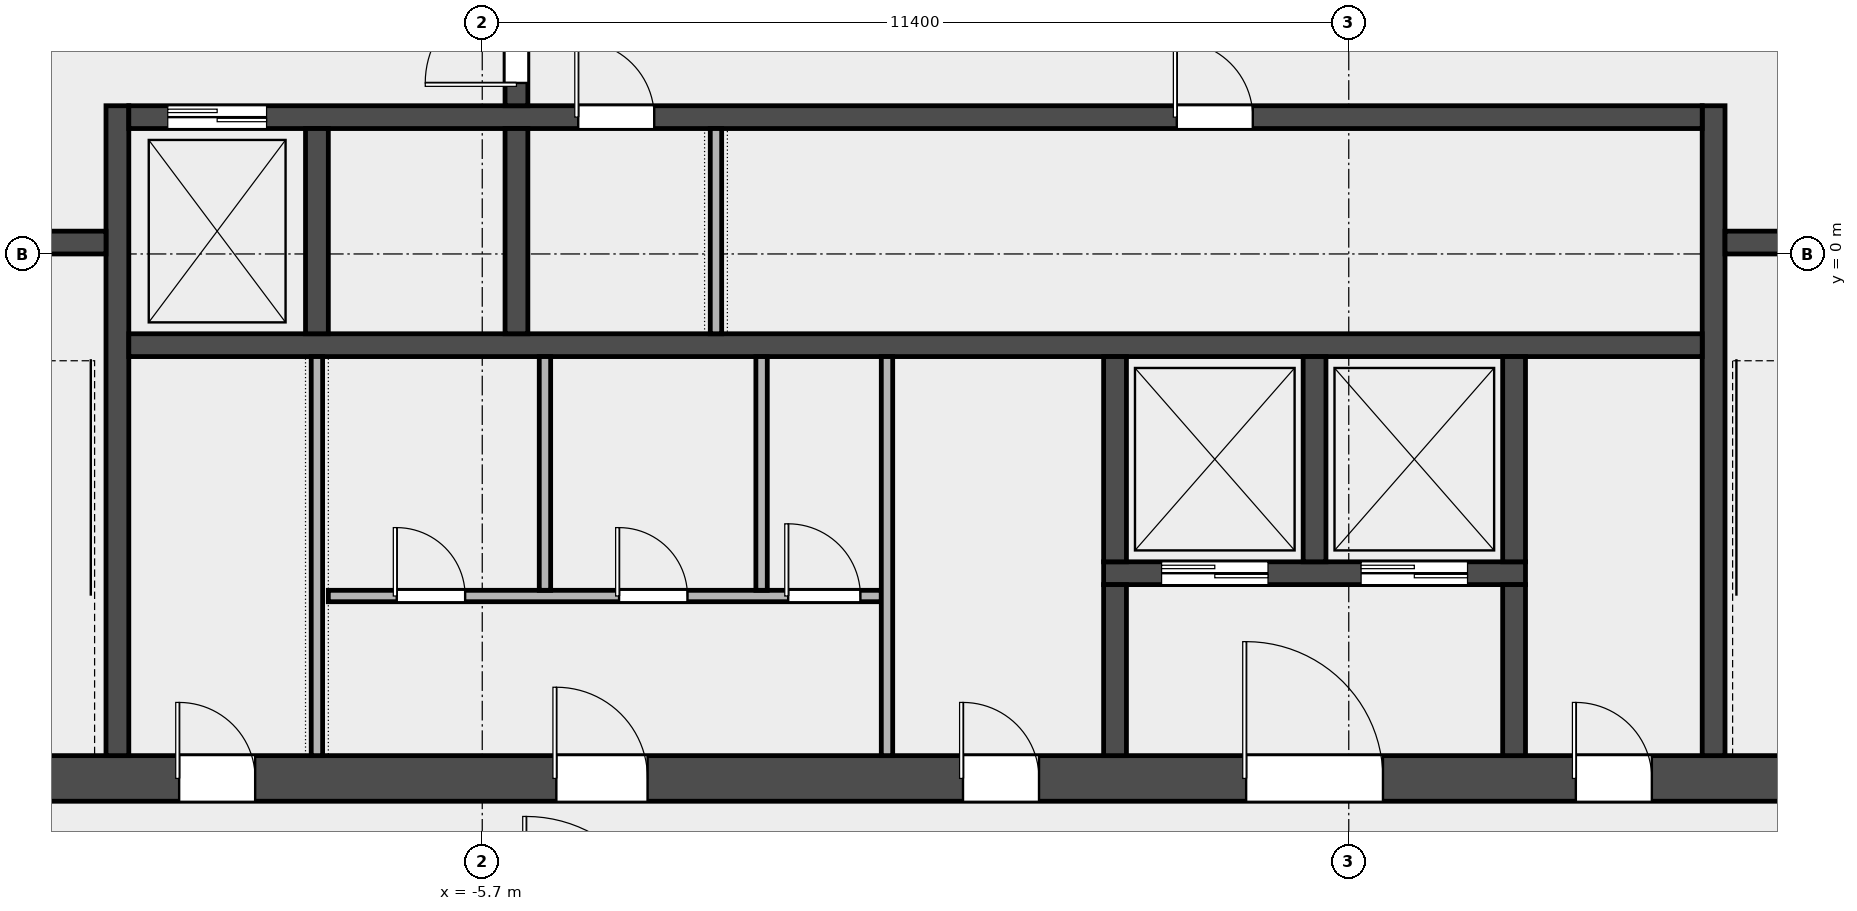
"""IFC4 building model, lengths in metres.
Left out: names, types, materials, properties, quantities, classifications, styles, units other than length and angle.
Written with IfcOpenShell. Run it as: python <this file> out.ifc"""

import sys

from ifc_helpers import new_model, si_unit, direction, frame, frame_2d, origin, place, context, subcontext, project, spatial, rectangle, extrude, element, fill, save


model = new_model("IFC4")
c1 = context("Model", 3, precision=1e-05, world=origin(), true_north=direction((0.0, 1.0)))
c2 = subcontext(c1, "Body", "Model", "MODEL_VIEW")
j1 = project(units=[si_unit("LENGTHUNIT", "METRE"), si_unit("PLANEANGLEUNIT", "RADIAN")], contexts=[c1])
p1 = place(None, origin())
s1 = spatial("IfcSite", under=j1, at=p1, CompositionType="ELEMENT")
p2 = place(p1, origin())
s2 = spatial("IfcBuilding", under=s1, at=p2, CompositionType="ELEMENT")
p3 = place(p2, frame((0.0, 0.0, 333.4)))
s3 = spatial("IfcBuildingStorey", under=s2, at=p3, CompositionType="ELEMENT", Elevation=333.4)
p4 = place(p3, frame((-14.4, -6.9, 0.0), z_axis=(0.0, 0.0, 1.0), x_axis=(1.0, 0.0, 0.0)))
e1 = element("IfcWall", 1, at=p4, inside=s3, PredefinedType="SHEAR", context=c2, shape_type="SweptSolid", body=[
    extrude(rectangle(XDim=28.8, YDim=0.6, at=frame_2d((14.4, 0.0))), origin(), (0.0, 0.0, 1.0), 3.7),
])
p5 = place(p4, frame((4.712, 0.0, 0.0)))
e2 = element("IfcOpeningElement", 2, at=p5, cuts=e1, PredefinedType="OPENING", context=c2, shape_type="SweptSolid", body=[
    extrude(rectangle(XDim=1.0, YDim=2.1, at=frame_2d((0.5, 1.05))), frame((0.0, 0.312, 0.0), z_axis=(0.0, -1.0, 0.0), x_axis=(1.0, 0.0, 0.0)), (0.0, 0.0, 1.0), 0.624),
])
p6 = place(p4, frame((9.675, 0.0, 0.0)))
e3 = element("IfcOpeningElement", 3, at=p6, cuts=e1, PredefinedType="OPENING", context=c2, shape_type="SweptSolid", body=[
    extrude(rectangle(XDim=1.2, YDim=2.1, at=frame_2d((0.6, 1.05))), frame((0.0, 0.312, 0.0), z_axis=(0.0, -1.0, 0.0), x_axis=(1.0, 0.0, 0.0)), (0.0, 0.0, 1.0), 0.624),
])
p7 = place(p4, frame((15.025, 0.0, 0.0)))
e4 = element("IfcOpeningElement", 4, at=p7, cuts=e1, PredefinedType="OPENING", context=c2, shape_type="SweptSolid", body=[
    extrude(rectangle(XDim=1.0, YDim=2.1, at=frame_2d((0.5, 1.05))), frame((0.0, 0.312, 0.0), z_axis=(0.0, -1.0, 0.0), x_axis=(1.0, 0.0, 0.0)), (0.0, 0.0, 1.0), 0.624),
])
p8 = place(p4, frame((18.75, 0.0, 0.0)))
e5 = element("IfcOpeningElement", 5, at=p8, cuts=e1, PredefinedType="OPENING", context=c2, shape_type="SweptSolid", body=[
    extrude(rectangle(XDim=1.8, YDim=2.1, at=frame_2d((0.9, 1.05))), frame((0.0, 0.312, 0.0), z_axis=(0.0, -1.0, 0.0), x_axis=(1.0, 0.0, 0.0)), (0.0, 0.0, 1.0), 0.624),
])
p9 = place(p4, frame((23.087, 0.0, 0.0)))
e6 = element("IfcOpeningElement", 6, at=p9, cuts=e1, PredefinedType="OPENING", context=c2, shape_type="SweptSolid", body=[
    extrude(rectangle(XDim=1.0, YDim=2.1, at=frame_2d((0.5, 1.05))), frame((0.0, 0.312, 0.0), z_axis=(0.0, -1.0, 0.0), x_axis=(1.0, 0.0, 0.0)), (0.0, 0.0, 1.0), 0.624),
])
for number, where, z_axis, x_axis in (
    (7, (-10.5, -6.6, 0.0), (0.0, 0.0, 1.0), (0.0, 1.0, 0.0)),
    (8, (10.5, -6.6, 0.0), (0.0, 0.0, 1.0), (0.0, 1.0, 0.0)),
):
    element("IfcWall", number, at=place(p3, frame(where, z_axis=z_axis, x_axis=x_axis)), inside=s3, PredefinedType="SHEAR", context=c2, shape_type="SweptSolid", body=[
        extrude(rectangle(XDim=8.55, YDim=0.3, at=frame_2d((4.275, 0.0))), origin(), (0.0, 0.0, 1.0), 3.7),
    ])
p10 = place(p3, frame((-13.8, 0.15, 0.0), z_axis=(0.0, 0.0, 1.0), x_axis=(1.0, 0.0, 0.0)))
e9 = element("IfcWall", 9, at=p10, inside=s3, PredefinedType="SOLIDWALL", context=c2, shape_type="SweptSolid", body=[
    extrude(rectangle(XDim=3.15, YDim=0.3, at=frame_2d((1.575, 0.0))), origin(), (0.0, 0.0, 1.0), 3.7),
])
p11 = place(p10, frame((0.975, 0.0, 0.0)))
e10 = element("IfcOpeningElement", 10, at=p11, cuts=e9, PredefinedType="OPENING", context=c2, shape_type="SweptSolid", body=[
    extrude(rectangle(XDim=1.1, YDim=2.1, at=frame_2d((0.55, 1.05))), frame((0.0, 0.162, 0.0), z_axis=(0.0, -1.0, 0.0), x_axis=(1.0, 0.0, 0.0)), (0.0, 0.0, 1.0), 0.324),
])
p12 = place(p3, frame((10.65, 0.15, 0.0), z_axis=(0.0, 0.0, 1.0), x_axis=(1.0, 0.0, 0.0)))
e11 = element("IfcWall", 11, at=p12, inside=s3, PredefinedType="SOLIDWALL", context=c2, shape_type="SweptSolid", body=[
    extrude(rectangle(XDim=3.15, YDim=0.3, at=frame_2d((1.575, 0.0))), origin(), (0.0, 0.0, 1.0), 3.7),
])
p13 = place(p12, frame((1.025, 0.0, 0.0)))
e12 = element("IfcOpeningElement", 12, at=p13, cuts=e11, PredefinedType="OPENING", context=c2, shape_type="SweptSolid", body=[
    extrude(rectangle(XDim=1.1, YDim=2.1, at=frame_2d((0.55, 1.05))), frame((0.0, 0.162, 0.0), z_axis=(0.0, -1.0, 0.0), x_axis=(1.0, 0.0, 0.0)), (0.0, 0.0, 1.0), 0.324),
])
p14 = place(p3, frame((-10.35, -1.2, 0.0), z_axis=(0.0, 0.0, 1.0), x_axis=(1.0, 0.0, 0.0)))
e13 = element("IfcWall", 13, at=p14, inside=s3, PredefinedType="SOLIDWALL", context=c2, shape_type="SweptSolid", body=[
    extrude(rectangle(XDim=20.7, YDim=0.3, at=frame_2d((10.35, 0.0))), origin(), (0.0, 0.0, 1.0), 3.7),
])
p15 = place(p3, frame((-10.35, 1.8, 0.0), z_axis=(0.0, 0.0, 1.0), x_axis=(1.0, 0.0, 0.0)))
e14 = element("IfcWall", 14, at=p15, inside=s3, PredefinedType="SOLIDWALL", context=c2, shape_type="SweptSolid", body=[
    extrude(rectangle(XDim=20.7, YDim=0.3, at=frame_2d((10.35, 0.0))), origin(), (0.0, 0.0, 1.0), 3.7),
])
p16 = place(p15, frame((0.512, 0.0, 0.0)))
e15 = element("IfcOpeningElement", 15, at=p16, cuts=e14, PredefinedType="OPENING", context=c2, shape_type="SweptSolid", body=[
    extrude(rectangle(XDim=1.3, YDim=2.1, at=frame_2d((0.65, 1.05))), frame((0.0, 0.162, 0.0), z_axis=(0.0, -1.0, 0.0), x_axis=(1.0, 0.0, 0.0)), (0.0, 0.0, 1.0), 0.324),
])
p17 = place(p15, frame((5.913, 0.0, 0.0)))
e16 = element("IfcOpeningElement", 16, at=p17, cuts=e14, PredefinedType="OPENING", context=c2, shape_type="SweptSolid", body=[
    extrude(rectangle(XDim=1.0, YDim=2.1, at=frame_2d((0.5, 1.05))), frame((0.0, 0.162, 0.0), z_axis=(0.0, -1.0, 0.0), x_axis=(1.0, 0.0, 0.0)), (0.0, 0.0, 1.0), 0.324),
])
p18 = place(p15, frame((13.788, 0.0, 0.0)))
e17 = element("IfcOpeningElement", 17, at=p18, cuts=e14, PredefinedType="OPENING", context=c2, shape_type="SweptSolid", body=[
    extrude(rectangle(XDim=1.0, YDim=2.1, at=frame_2d((0.5, 1.05))), frame((0.0, 0.162, 0.0), z_axis=(0.0, -1.0, 0.0), x_axis=(1.0, 0.0, 0.0)), (0.0, 0.0, 1.0), 0.324),
])
for number, where, z_axis, x_axis in (
    (18, (-7.875, -1.05, 0.0), (0.0, 0.0, 1.0), (0.0, 1.0, 0.0)),
    (19, (-5.25, -1.05, 0.0), (0.0, 0.0, 1.0), (0.0, 1.0, 0.0)),
):
    element("IfcWall", number, at=place(p3, frame(where, z_axis=z_axis, x_axis=x_axis)), inside=s3, PredefinedType="SOLIDWALL", context=c2, shape_type="SweptSolid", body=[
        extrude(rectangle(XDim=2.7, YDim=0.3, at=frame_2d((1.35, 0.0))), origin(), (0.0, 0.0, 1.0), 3.7),
    ])
p19 = place(p3, frame((-5.25, 1.95, 0.0), z_axis=(0.0, 0.0, 1.0), x_axis=(0.0, 1.0, 0.0)))
e20 = element("IfcWall", 20, at=p19, inside=s3, PredefinedType="SOLIDWALL", context=c2, shape_type="SweptSolid", body=[
    extrude(rectangle(XDim=3.3, YDim=0.3, at=frame_2d((1.65, 0.0))), origin(), (0.0, 0.0, 1.0), 3.7),
])
p20 = place(p19, frame((0.3, 0.0, 0.0)))
e21 = element("IfcOpeningElement", 21, at=p20, cuts=e20, PredefinedType="OPENING", context=c2, shape_type="SweptSolid", body=[
    extrude(rectangle(XDim=1.2, YDim=2.1, at=frame_2d((0.6, 1.05))), frame((0.0, 0.162, 0.0), z_axis=(0.0, -1.0, 0.0), x_axis=(1.0, 0.0, 0.0)), (0.0, 0.0, 1.0), 0.324),
])
p21 = place(p19, frame((1.8, 0.0, 0.0)))
e22 = element("IfcOpeningElement", 22, at=p21, cuts=e20, PredefinedType="OPENING", context=c2, shape_type="SweptSolid", body=[
    extrude(rectangle(XDim=1.2, YDim=2.1, at=frame_2d((0.6, 1.05))), frame((0.0, 0.162, 0.0), z_axis=(0.0, -1.0, 0.0), x_axis=(1.0, 0.0, 0.0)), (0.0, 0.0, 1.0), 0.324),
])
p22 = place(p3, frame((2.475, -4.2, 0.0), z_axis=(0.0, 0.0, 1.0), x_axis=(1.0, 0.0, 0.0)))
e23 = element("IfcWall", 23, at=p22, inside=s3, PredefinedType="SOLIDWALL", context=c2, shape_type="SweptSolid", body=[
    extrude(rectangle(XDim=5.55, YDim=0.3, at=frame_2d((2.775, 0.0))), origin(), (0.0, 0.0, 1.0), 3.7),
])
p23 = place(p22, frame((0.762, 0.0, 0.0)))
e24 = element("IfcOpeningElement", 24, at=p23, cuts=e23, PredefinedType="OPENING", context=c2, shape_type="SweptSolid", body=[
    extrude(rectangle(XDim=1.4, YDim=2.1, at=frame_2d((0.7, 1.05))), frame((0.0, 0.162, 0.0), z_axis=(0.0, -1.0, 0.0), x_axis=(1.0, 0.0, 0.0)), (0.0, 0.0, 1.0), 0.324),
])
p24 = place(p22, frame((3.387, 0.0, 0.0)))
e25 = element("IfcOpeningElement", 25, at=p24, cuts=e23, PredefinedType="OPENING", context=c2, shape_type="SweptSolid", body=[
    extrude(rectangle(XDim=1.4, YDim=2.1, at=frame_2d((0.7, 1.05))), frame((0.0, 0.162, 0.0), z_axis=(0.0, -1.0, 0.0), x_axis=(1.0, 0.0, 0.0)), (0.0, 0.0, 1.0), 0.324),
])
p25 = place(p3, frame((2.625, -4.05, 0.0), z_axis=(0.0, 0.0, 1.0), x_axis=(0.0, 1.0, 0.0)))
e26 = element("IfcWall", 26, at=p25, inside=s3, PredefinedType="SOLIDWALL", context=c2, shape_type="SweptSolid", body=[
    extrude(rectangle(XDim=2.7, YDim=0.3, at=frame_2d((1.35, 0.0))), origin(), (0.0, 0.0, 1.0), 3.7),
])
p26 = place(p3, frame((2.625, -6.6, 0.0), z_axis=(0.0, 0.0, 1.0), x_axis=(0.0, 1.0, 0.0)))
e27 = element("IfcWall", 27, at=p26, inside=s3, PredefinedType="SOLIDWALL", context=c2, shape_type="SweptSolid", body=[
    extrude(rectangle(XDim=2.25, YDim=0.3, at=frame_2d((1.125, 0.0))), origin(), (0.0, 0.0, 1.0), 3.7),
])
for number, where, z_axis, x_axis in (
    (28, (5.25, -4.05, 0.0), (0.0, 0.0, 1.0), (0.0, 1.0, 0.0)),
    (29, (7.875, -4.05, 0.0), (0.0, 0.0, 1.0), (0.0, 1.0, 0.0)),
):
    element("IfcWall", number, at=place(p3, frame(where, z_axis=z_axis, x_axis=x_axis)), inside=s3, PredefinedType="SOLIDWALL", context=c2, shape_type="SweptSolid", body=[
        extrude(rectangle(XDim=2.7, YDim=0.3, at=frame_2d((1.35, 0.0))), origin(), (0.0, 0.0, 1.0), 3.7),
    ])
p27 = place(p3, frame((7.875, -6.6, 0.0), z_axis=(0.0, 0.0, 1.0), x_axis=(0.0, 1.0, 0.0)))
e30 = element("IfcWall", 30, at=p27, inside=s3, PredefinedType="SOLIDWALL", context=c2, shape_type="SweptSolid", body=[
    extrude(rectangle(XDim=2.25, YDim=0.3, at=frame_2d((1.125, 0.0))), origin(), (0.0, 0.0, 1.0), 3.7),
])
p28 = place(p3, frame((-7.875, -6.6, 0.0), z_axis=(0.0, 0.0, 1.0), x_axis=(0.0, 1.0, 0.0)))
e31 = element("IfcWall", 31, at=p28, inside=s3, PredefinedType="PARTITIONING", context=c2, shape_type="SweptSolid", body=[
    extrude(rectangle(XDim=5.25, YDim=0.15, at=frame_2d((2.625, 0.0))), origin(), (0.0, 0.0, 1.0), 3.7),
])
p29 = place(p3, frame((-7.725, -4.5, 0.0), z_axis=(0.0, 0.0, 1.0), x_axis=(1.0, 0.0, 0.0)))
e32 = element("IfcWall", 32, at=p29, inside=s3, PredefinedType="PARTITIONING", context=c2, shape_type="SweptSolid", body=[
    extrude(rectangle(XDim=7.275, YDim=0.15, at=frame_2d((3.638, 0.0))), origin(), (0.0, 0.0, 1.0), 3.7),
])
p30 = place(p29, frame((0.9, 0.0, 0.0)))
e33 = element("IfcOpeningElement", 33, at=p30, cuts=e32, PredefinedType="OPENING", context=c2, shape_type="SweptSolid", body=[
    extrude(rectangle(XDim=0.9, YDim=2.1, at=frame_2d((0.45, 1.05))), frame((0.0, 0.087, 0.0), z_axis=(0.0, -1.0, 0.0), x_axis=(1.0, 0.0, 0.0)), (0.0, 0.0, 1.0), 0.174),
])
p31 = place(p29, frame((3.825, 0.0, 0.0)))
e34 = element("IfcOpeningElement", 34, at=p31, cuts=e32, PredefinedType="OPENING", context=c2, shape_type="SweptSolid", body=[
    extrude(rectangle(XDim=0.9, YDim=2.1, at=frame_2d((0.45, 1.05))), frame((0.0, 0.087, 0.0), z_axis=(0.0, -1.0, 0.0), x_axis=(1.0, 0.0, 0.0)), (0.0, 0.0, 1.0), 0.174),
])
p32 = place(p29, frame((6.05, 0.0, 0.0)))
e35 = element("IfcOpeningElement", 35, at=p32, cuts=e32, PredefinedType="OPENING", context=c2, shape_type="SweptSolid", body=[
    extrude(rectangle(XDim=0.95, YDim=2.1, at=frame_2d((0.475, 1.05))), frame((0.0, 0.087, 0.0), z_axis=(0.0, -1.0, 0.0), x_axis=(1.0, 0.0, 0.0)), (0.0, 0.0, 1.0), 0.174),
])
for number, where, z_axis, x_axis in (
    (36, (-4.875, -4.425, 0.0), (0.0, 0.0, 1.0), (0.0, 1.0, 0.0)),
    (37, (-2.025, -4.425, 0.0), (0.0, 0.0, 1.0), (0.0, 1.0, 0.0)),
):
    element("IfcWall", number, at=place(p3, frame(where, z_axis=z_axis, x_axis=x_axis)), inside=s3, PredefinedType="PARTITIONING", context=c2, shape_type="SweptSolid", body=[
        extrude(rectangle(XDim=3.075, YDim=0.15, at=frame_2d((1.538, 0.0))), origin(), (0.0, 0.0, 1.0), 3.7),
    ])
p33 = place(p3, frame((-0.375, -6.6, 0.0), z_axis=(0.0, 0.0, 1.0), x_axis=(0.0, 1.0, 0.0)))
e38 = element("IfcWall", 38, at=p33, inside=s3, PredefinedType="PARTITIONING", context=c2, shape_type="SweptSolid", body=[
    extrude(rectangle(XDim=5.25, YDim=0.15, at=frame_2d((2.625, 0.0))), origin(), (0.0, 0.0, 1.0), 3.7),
])
p34 = place(p3, frame((-2.625, -1.05, 0.0), z_axis=(0.0, 0.0, 1.0), x_axis=(0.0, 1.0, 0.0)))
e39 = element("IfcWall", 39, at=p34, inside=s3, PredefinedType="PARTITIONING", context=c2, shape_type="SweptSolid", body=[
    extrude(rectangle(XDim=2.7, YDim=0.15, at=frame_2d((1.35, 0.0))), origin(), (0.0, 0.0, 1.0), 3.7),
])
p35 = place(p20, origin())
e40 = element("IfcDoor", 40, at=p35, inside=s3, OperationType="SINGLE_SWING_LEFT", PredefinedType="DOOR", context=c2, shape_type="SweptSolid", body=[
    extrude(rectangle(XDim=1.2, YDim=2.1, at=frame_2d((0.6, 1.05))), frame((0.0, 0.025, 0.0), z_axis=(0.0, -1.0, 0.0), x_axis=(1.0, 0.0, 0.0)), (0.0, 0.0, 1.0), 0.05),
])
fill(e21, e40)
p36 = place(p16, origin())
e41 = element("IfcDoor", 41, at=p36, inside=s3, OperationType="DOUBLE_DOOR_SLIDING", PredefinedType="DOOR", context=c2, shape_type="SweptSolid", body=[
    extrude(rectangle(XDim=1.3, YDim=2.1, at=frame_2d((0.65, 1.05))), frame((0.0, 0.025, 0.0), z_axis=(0.0, -1.0, 0.0), x_axis=(1.0, 0.0, 0.0)), (0.0, 0.0, 1.0), 0.05),
])
fill(e15, e41)
p37 = place(p23, origin())
e42 = element("IfcDoor", 42, at=p37, inside=s3, OperationType="DOUBLE_DOOR_SLIDING", PredefinedType="DOOR", context=c2, shape_type="SweptSolid", body=[
    extrude(rectangle(XDim=1.4, YDim=2.1, at=frame_2d((0.7, 1.05))), frame((0.0, 0.025, 0.0), z_axis=(0.0, -1.0, 0.0), x_axis=(1.0, 0.0, 0.0)), (0.0, 0.0, 1.0), 0.05),
])
fill(e24, e42)
p38 = place(p24, origin())
e43 = element("IfcDoor", 43, at=p38, inside=s3, OperationType="DOUBLE_DOOR_SLIDING", PredefinedType="DOOR", context=c2, shape_type="SweptSolid", body=[
    extrude(rectangle(XDim=1.4, YDim=2.1, at=frame_2d((0.7, 1.05))), frame((0.0, 0.025, 0.0), z_axis=(0.0, -1.0, 0.0), x_axis=(1.0, 0.0, 0.0)), (0.0, 0.0, 1.0), 0.05),
])
fill(e25, e43)
p39 = place(p5, origin())
e44 = element("IfcDoor", 44, at=p39, inside=s3, OperationType="SINGLE_SWING_LEFT", PredefinedType="DOOR", context=c2, shape_type="SweptSolid", body=[
    extrude(rectangle(XDim=1.0, YDim=2.1, at=frame_2d((0.5, 1.05))), frame((0.0, 0.025, 0.0), z_axis=(0.0, -1.0, 0.0), x_axis=(1.0, 0.0, 0.0)), (0.0, 0.0, 1.0), 0.05),
])
fill(e2, e44)
p40 = place(p6, origin())
e45 = element("IfcDoor", 45, at=p40, inside=s3, OperationType="SINGLE_SWING_LEFT", PredefinedType="DOOR", context=c2, shape_type="SweptSolid", body=[
    extrude(rectangle(XDim=1.2, YDim=2.1, at=frame_2d((0.6, 1.05))), frame((0.0, 0.025, 0.0), z_axis=(0.0, -1.0, 0.0), x_axis=(1.0, 0.0, 0.0)), (0.0, 0.0, 1.0), 0.05),
])
fill(e3, e45)
p41 = place(p30, origin())
e46 = element("IfcDoor", 46, at=p41, inside=s3, OperationType="SINGLE_SWING_LEFT", PredefinedType="DOOR", context=c2, shape_type="SweptSolid", body=[
    extrude(rectangle(XDim=0.9, YDim=2.1, at=frame_2d((0.45, 1.05))), frame((0.0, 0.025, 0.0), z_axis=(0.0, -1.0, 0.0), x_axis=(1.0, 0.0, 0.0)), (0.0, 0.0, 1.0), 0.05),
])
fill(e33, e46)
p42 = place(p31, origin())
e47 = element("IfcDoor", 47, at=p42, inside=s3, OperationType="SINGLE_SWING_LEFT", PredefinedType="DOOR", context=c2, shape_type="SweptSolid", body=[
    extrude(rectangle(XDim=0.9, YDim=2.1, at=frame_2d((0.45, 1.05))), frame((0.0, 0.025, 0.0), z_axis=(0.0, -1.0, 0.0), x_axis=(1.0, 0.0, 0.0)), (0.0, 0.0, 1.0), 0.05),
])
fill(e34, e47)
p43 = place(p32, origin())
e48 = element("IfcDoor", 48, at=p43, inside=s3, OperationType="SINGLE_SWING_LEFT", PredefinedType="DOOR", context=c2, shape_type="SweptSolid", body=[
    extrude(rectangle(XDim=0.95, YDim=2.1, at=frame_2d((0.475, 1.05))), frame((0.0, 0.025, 0.0), z_axis=(0.0, -1.0, 0.0), x_axis=(1.0, 0.0, 0.0)), (0.0, 0.0, 1.0), 0.05),
])
fill(e35, e48)
p44 = place(p7, origin())
e49 = element("IfcDoor", 49, at=p44, inside=s3, OperationType="SINGLE_SWING_LEFT", PredefinedType="DOOR", context=c2, shape_type="SweptSolid", body=[
    extrude(rectangle(XDim=1.0, YDim=2.1, at=frame_2d((0.5, 1.05))), frame((0.0, 0.025, 0.0), z_axis=(0.0, -1.0, 0.0), x_axis=(1.0, 0.0, 0.0)), (0.0, 0.0, 1.0), 0.05),
])
fill(e4, e49)
p45 = place(p8, origin())
e50 = element("IfcDoor", 50, at=p45, inside=s3, OperationType="DOUBLE_DOOR_SINGLE_SWING", PredefinedType="DOOR", context=c2, shape_type="SweptSolid", body=[
    extrude(rectangle(XDim=1.8, YDim=2.1, at=frame_2d((0.9, 1.05))), frame((0.0, 0.025, 0.0), z_axis=(0.0, -1.0, 0.0), x_axis=(1.0, 0.0, 0.0)), (0.0, 0.0, 1.0), 0.05),
])
fill(e5, e50)
p46 = place(p9, origin())
e51 = element("IfcDoor", 51, at=p46, inside=s3, OperationType="SINGLE_SWING_LEFT", PredefinedType="DOOR", context=c2, shape_type="SweptSolid", body=[
    extrude(rectangle(XDim=1.0, YDim=2.1, at=frame_2d((0.5, 1.05))), frame((0.0, 0.025, 0.0), z_axis=(0.0, -1.0, 0.0), x_axis=(1.0, 0.0, 0.0)), (0.0, 0.0, 1.0), 0.05),
])
fill(e6, e51)
p47 = place(p17, origin())
e52 = element("IfcDoor", 52, at=p47, inside=s3, OperationType="SINGLE_SWING_LEFT", PredefinedType="DOOR", context=c2, shape_type="SweptSolid", body=[
    extrude(rectangle(XDim=1.0, YDim=2.1, at=frame_2d((0.5, 1.05))), frame((0.0, 0.025, 0.0), z_axis=(0.0, -1.0, 0.0), x_axis=(1.0, 0.0, 0.0)), (0.0, 0.0, 1.0), 0.05),
])
fill(e16, e52)
p48 = place(p18, origin())
e53 = element("IfcDoor", 53, at=p48, inside=s3, OperationType="SINGLE_SWING_LEFT", PredefinedType="DOOR", context=c2, shape_type="SweptSolid", body=[
    extrude(rectangle(XDim=1.0, YDim=2.1, at=frame_2d((0.5, 1.05))), frame((0.0, 0.025, 0.0), z_axis=(0.0, -1.0, 0.0), x_axis=(1.0, 0.0, 0.0)), (0.0, 0.0, 1.0), 0.05),
])
fill(e17, e53)
save(model, sys.argv[1])
